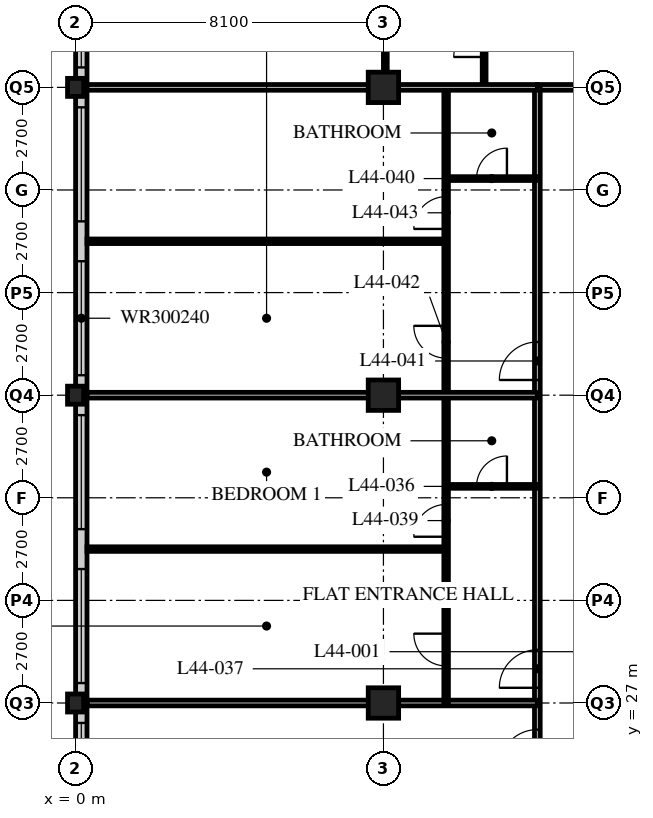
"""IFC4 building model, lengths in metres.
Left out: names, types, materials, properties, quantities, classifications, styles, units other than length and angle.
Written with IfcOpenShell. Run it as: python <this file> out.ifc"""

import sys

from ifc_helpers import new_model, si_unit, direction, frame, frame_2d, origin, origin_2d, place, context, subcontext, project, spatial, rectangle, hollow_rectangle, i_section, extrude, element, fill, save


model = new_model("IFC4")
c1 = context("Model", 3, precision=1e-05, world=origin(), true_north=direction((0.0, 1.0)))
c2 = subcontext(c1, "Body", "Model", "MODEL_VIEW")
j1 = project(units=[si_unit("LENGTHUNIT", "METRE"), si_unit("PLANEANGLEUNIT", "RADIAN")], contexts=[c1])
p1 = place(None, origin())
s1 = spatial("IfcSite", under=j1, at=p1, CompositionType="ELEMENT")
p2 = place(p1, origin())
s2 = spatial("IfcBuilding", under=s1, at=p2, CompositionType="ELEMENT")
p3 = place(p2, frame((0.0, 0.0, 174.0)))
s3 = spatial("IfcBuildingStorey", under=s2, at=p3, CompositionType="ELEMENT", Elevation=174.0)
for number, where, z_axis, x_axis in (
    (1, (0.0, 27.0, 0.0), (0.0, 0.0, 1.0), (1.0, 0.0, 0.0)),
    (2, (0.0, 35.1, 0.0), (0.0, 0.0, 1.0), (1.0, 0.0, 0.0)),
    (3, (0.0, 43.2, 0.0), (0.0, 0.0, 1.0), (1.0, 0.0, 0.0)),
):
    element("IfcColumn", number, at=place(p3, frame(where, z_axis=z_axis, x_axis=x_axis)), inside=s3, PredefinedType="COLUMN", context=c2, shape_type="SweptSolid", body=[
        extrude(i_section(OverallWidth=0.424, OverallDepth=0.475, WebThickness=0.048, FlangeThickness=0.077, FilletRadius=0.015, at=origin_2d()), origin(), (0.0, 0.0, 1.0), 3.6),
    ])
for number, where, z_axis, x_axis in (
    (4, (8.1, 27.0, 0.0), (0.0, 0.0, 1.0), (1.0, 0.0, 0.0)),
    (5, (8.1, 35.1, 0.0), (0.0, 0.0, 1.0), (1.0, 0.0, 0.0)),
    (6, (8.1, 43.2, 0.0), (0.0, 0.0, 1.0), (1.0, 0.0, 0.0)),
):
    element("IfcColumn", number, at=place(p3, frame(where, z_axis=z_axis, x_axis=x_axis)), inside=s3, PredefinedType="COLUMN", context=c2, shape_type="SweptSolid", body=[
        extrude(hollow_rectangle(XDim=0.8, YDim=0.8, WallThickness=0.08, at=origin_2d()), origin(), (0.0, 0.0, 1.0), 3.6),
    ])
p4 = place(p3, frame((0.15, 51.0, 0.0), z_axis=(0.0, 0.0, 1.0), x_axis=(0.0, -1.0, 0.0)))
e7 = element("IfcWall", 7, at=p4, inside=s3, PredefinedType="SOLIDWALL", context=c2, shape_type="SweptSolid", body=[
    extrude(rectangle(XDim=32.1, YDim=0.3, at=frame_2d((16.05, 0.0))), origin(), (0.0, 0.0, 1.0), 3.39),
])
p5 = place(p4, frame((0.225, 0.0, 0.6)))
e8 = element("IfcOpeningElement", 8, at=p5, cuts=e7, PredefinedType="OPENING", context=c2, shape_type="SweptSolid", body=[
    extrude(rectangle(XDim=3.0, YDim=2.4, at=frame_2d((1.5, 1.2))), frame((0.0, 0.16, 0.0), z_axis=(0.0, -1.0, 0.0), x_axis=(1.0, 0.0, 0.0)), (0.0, 0.0, 1.0), 0.32),
])
p6 = place(p4, frame((4.275, 0.0, 0.6)))
e9 = element("IfcOpeningElement", 9, at=p6, cuts=e7, PredefinedType="OPENING", context=c2, shape_type="SweptSolid", body=[
    extrude(rectangle(XDim=3.0, YDim=2.4, at=frame_2d((1.5, 1.2))), frame((0.0, 0.16, 0.0), z_axis=(0.0, -1.0, 0.0), x_axis=(1.0, 0.0, 0.0)), (0.0, 0.0, 1.0), 0.32),
])
p7 = place(p4, frame((8.325, 0.0, 0.6)))
e10 = element("IfcOpeningElement", 10, at=p7, cuts=e7, PredefinedType="OPENING", context=c2, shape_type="SweptSolid", body=[
    extrude(rectangle(XDim=3.0, YDim=2.4, at=frame_2d((1.5, 1.2))), frame((0.0, 0.16, 0.0), z_axis=(0.0, -1.0, 0.0), x_axis=(1.0, 0.0, 0.0)), (0.0, 0.0, 1.0), 0.32),
])
p8 = place(p4, frame((12.375, 0.0, 0.6)))
e11 = element("IfcOpeningElement", 11, at=p8, cuts=e7, PredefinedType="OPENING", context=c2, shape_type="SweptSolid", body=[
    extrude(rectangle(XDim=3.0, YDim=2.4, at=frame_2d((1.5, 1.2))), frame((0.0, 0.16, 0.0), z_axis=(0.0, -1.0, 0.0), x_axis=(1.0, 0.0, 0.0)), (0.0, 0.0, 1.0), 0.32),
])
p9 = place(p4, frame((16.425, 0.0, 0.6)))
e12 = element("IfcOpeningElement", 12, at=p9, cuts=e7, PredefinedType="OPENING", context=c2, shape_type="SweptSolid", body=[
    extrude(rectangle(XDim=3.0, YDim=2.4, at=frame_2d((1.5, 1.2))), frame((0.0, 0.16, 0.0), z_axis=(0.0, -1.0, 0.0), x_axis=(1.0, 0.0, 0.0)), (0.0, 0.0, 1.0), 0.32),
])
p10 = place(p4, frame((20.475, 0.0, 0.6)))
e13 = element("IfcOpeningElement", 13, at=p10, cuts=e7, PredefinedType="OPENING", context=c2, shape_type="SweptSolid", body=[
    extrude(rectangle(XDim=3.0, YDim=2.4, at=frame_2d((1.5, 1.2))), frame((0.0, 0.16, 0.0), z_axis=(0.0, -1.0, 0.0), x_axis=(1.0, 0.0, 0.0)), (0.0, 0.0, 1.0), 0.32),
])
p11 = place(p4, frame((24.525, 0.0, 0.6)))
e14 = element("IfcOpeningElement", 14, at=p11, cuts=e7, PredefinedType="OPENING", context=c2, shape_type="SweptSolid", body=[
    extrude(rectangle(XDim=3.0, YDim=2.4, at=frame_2d((1.5, 1.2))), frame((0.0, 0.16, 0.0), z_axis=(0.0, -1.0, 0.0), x_axis=(1.0, 0.0, 0.0)), (0.0, 0.0, 1.0), 0.32),
])
p12 = place(p4, frame((28.575, 0.0, 0.6)))
e15 = element("IfcOpeningElement", 15, at=p12, cuts=e7, PredefinedType="OPENING", context=c2, shape_type="SweptSolid", body=[
    extrude(rectangle(XDim=3.0, YDim=2.4, at=frame_2d((1.5, 1.2))), frame((0.0, 0.16, 0.0), z_axis=(0.0, -1.0, 0.0), x_axis=(1.0, 0.0, 0.0)), (0.0, 0.0, 1.0), 0.32),
])
p13 = place(p3, frame((12.15, 43.2, 0.0), z_axis=(0.0, 0.0, 1.0), x_axis=(1.0, 0.0, 0.0)))
e16 = element("IfcWall", 16, at=p13, inside=s3, PredefinedType="PARTITIONING", context=c2, shape_type="SweptSolid", body=[
    extrude(rectangle(XDim=32.4, YDim=0.15, at=frame_2d((16.2, 0.0))), origin(), (0.0, 0.0, 1.0), 2.778),
])
p14 = place(p13, frame((4.95, 0.0, 0.0)))
e17 = element("IfcOpeningElement", 17, at=p14, cuts=e16, PredefinedType="OPENING", context=c2, shape_type="SweptSolid", body=[
    extrude(rectangle(XDim=1.0, YDim=2.1, at=frame_2d((0.5, 1.05))), frame((0.0, 0.085, 0.0), z_axis=(0.0, -1.0, 0.0), x_axis=(1.0, 0.0, 0.0)), (0.0, 0.0, 1.0), 0.17),
])
p15 = place(p13, frame((13.05, 0.0, 0.0)))
e18 = element("IfcOpeningElement", 18, at=p15, cuts=e16, PredefinedType="OPENING", context=c2, shape_type="SweptSolid", body=[
    extrude(rectangle(XDim=1.0, YDim=2.1, at=frame_2d((0.5, 1.05))), frame((0.0, 0.085, 0.0), z_axis=(0.0, -1.0, 0.0), x_axis=(1.0, 0.0, 0.0)), (0.0, 0.0, 1.0), 0.17),
])
p16 = place(p13, frame((21.15, 0.0, 0.0)))
e19 = element("IfcOpeningElement", 19, at=p16, cuts=e16, PredefinedType="OPENING", context=c2, shape_type="SweptSolid", body=[
    extrude(rectangle(XDim=1.0, YDim=2.1, at=frame_2d((0.5, 1.05))), frame((0.0, 0.085, 0.0), z_axis=(0.0, -1.0, 0.0), x_axis=(1.0, 0.0, 0.0)), (0.0, 0.0, 1.0), 0.17),
])
p17 = place(p13, frame((29.875, 0.0, 0.0)))
e20 = element("IfcOpeningElement", 20, at=p17, cuts=e16, PredefinedType="OPENING", context=c2, shape_type="SweptSolid", body=[
    extrude(rectangle(XDim=1.0, YDim=2.1, at=frame_2d((0.5, 1.05))), frame((0.0, 0.085, 0.0), z_axis=(0.0, -1.0, 0.0), x_axis=(1.0, 0.0, 0.0)), (0.0, 0.0, 1.0), 0.17),
])
p18 = place(p13, frame((1.525, 0.0, 0.0)))
e21 = element("IfcOpeningElement", 21, at=p18, cuts=e16, PredefinedType="OPENING", context=c2, shape_type="SweptSolid", body=[
    extrude(rectangle(XDim=1.0, YDim=2.1, at=frame_2d((0.5, 1.05))), frame((0.0, 0.085, 0.0), z_axis=(0.0, -1.0, 0.0), x_axis=(1.0, 0.0, 0.0)), (0.0, 0.0, 1.0), 0.17),
])
p19 = place(p3, frame((12.15, 18.9, 0.0), z_axis=(0.0, 0.0, 1.0), x_axis=(0.0, 1.0, 0.0)))
e22 = element("IfcWall", 22, at=p19, inside=s3, PredefinedType="PARTITIONING", context=c2, shape_type="SweptSolid", body=[
    extrude(rectangle(XDim=24.3, YDim=0.15, at=frame_2d((12.15, 0.0))), origin(), (0.0, 0.0, 1.0), 3.39),
])
p20 = place(p19, frame((2.35, 0.0, 0.0)))
e23 = element("IfcOpeningElement", 23, at=p20, cuts=e22, PredefinedType="OPENING", context=c2, shape_type="SweptSolid", body=[
    extrude(rectangle(XDim=1.0, YDim=2.1, at=frame_2d((0.5, 1.05))), frame((0.0, 0.085, 0.0), z_axis=(0.0, -1.0, 0.0), x_axis=(1.0, 0.0, 0.0)), (0.0, 0.0, 1.0), 0.17),
])
p21 = place(p19, frame((6.4, 0.0, 0.0)))
e24 = element("IfcOpeningElement", 24, at=p21, cuts=e22, PredefinedType="OPENING", context=c2, shape_type="SweptSolid", body=[
    extrude(rectangle(XDim=1.0, YDim=2.1, at=frame_2d((0.5, 1.05))), frame((0.0, 0.085, 0.0), z_axis=(0.0, -1.0, 0.0), x_axis=(1.0, 0.0, 0.0)), (0.0, 0.0, 1.0), 0.17),
])
p22 = place(p19, frame((8.5, 0.0, 0.0)))
e25 = element("IfcOpeningElement", 25, at=p22, cuts=e22, PredefinedType="OPENING", context=c2, shape_type="SweptSolid", body=[
    extrude(rectangle(XDim=1.0, YDim=2.1, at=frame_2d((0.5, 1.05))), frame((0.0, 0.085, 0.0), z_axis=(0.0, -1.0, 0.0), x_axis=(1.0, 0.0, 0.0)), (0.0, 0.0, 1.0), 0.17),
])
p23 = place(p19, frame((16.6, 0.0, 0.0)))
e26 = element("IfcOpeningElement", 26, at=p23, cuts=e22, PredefinedType="OPENING", context=c2, shape_type="SweptSolid", body=[
    extrude(rectangle(XDim=1.0, YDim=2.1, at=frame_2d((0.5, 1.05))), frame((0.0, 0.085, 0.0), z_axis=(0.0, -1.0, 0.0), x_axis=(1.0, 0.0, 0.0)), (0.0, 0.0, 1.0), 0.17),
])
p24 = place(p3, frame((12.15, 27.0, 0.0), z_axis=(0.0, 0.0, 1.0), x_axis=(-1.0, 0.0, 0.0)))
e27 = element("IfcWall", 27, at=p24, inside=s3, PredefinedType="PARTITIONING", context=c2, shape_type="SweptSolid", body=[
    extrude(rectangle(XDim=11.85, YDim=0.15, at=frame_2d((5.925, 0.0))), origin(), (0.0, 0.0, 1.0), 2.778),
])
p25 = place(p3, frame((9.75, 27.0, 0.0), z_axis=(0.0, 0.0, 1.0), x_axis=(0.0, 1.0, 0.0)))
e28 = element("IfcWall", 28, at=p25, inside=s3, PredefinedType="PARTITIONING", context=c2, shape_type="SweptSolid", body=[
    extrude(rectangle(XDim=16.2, YDim=0.12, at=frame_2d((8.1, 0.0))), origin(), (0.0, 0.0, 1.0), 3.39),
])
p26 = place(p25, frame((0.975, 0.0, 0.0)))
e29 = element("IfcOpeningElement", 29, at=p26, cuts=e28, PredefinedType="OPENING", context=c2, shape_type="SweptSolid", body=[
    extrude(rectangle(XDim=0.85, YDim=2.1, at=frame_2d((0.425, 1.05))), frame((0.0, 0.07, 0.0), z_axis=(0.0, -1.0, 0.0), x_axis=(1.0, 0.0, 0.0)), (0.0, 0.0, 1.0), 0.14),
])
p27 = place(p25, frame((4.375, 0.0, 0.0)))
e30 = element("IfcOpeningElement", 30, at=p27, cuts=e28, PredefinedType="OPENING", context=c2, shape_type="SweptSolid", body=[
    extrude(rectangle(XDim=0.85, YDim=2.1, at=frame_2d((0.425, 1.05))), frame((0.0, 0.07, 0.0), z_axis=(0.0, -1.0, 0.0), x_axis=(1.0, 0.0, 0.0)), (0.0, 0.0, 1.0), 0.14),
])
p28 = place(p25, frame((9.075, 0.0, 0.0)))
e31 = element("IfcOpeningElement", 31, at=p28, cuts=e28, PredefinedType="OPENING", context=c2, shape_type="SweptSolid", body=[
    extrude(rectangle(XDim=0.85, YDim=2.1, at=frame_2d((0.425, 1.05))), frame((0.0, 0.07, 0.0), z_axis=(0.0, -1.0, 0.0), x_axis=(1.0, 0.0, 0.0)), (0.0, 0.0, 1.0), 0.14),
])
p29 = place(p25, frame((12.475, 0.0, 0.0)))
e32 = element("IfcOpeningElement", 32, at=p29, cuts=e28, PredefinedType="OPENING", context=c2, shape_type="SweptSolid", body=[
    extrude(rectangle(XDim=0.85, YDim=2.1, at=frame_2d((0.425, 1.05))), frame((0.0, 0.07, 0.0), z_axis=(0.0, -1.0, 0.0), x_axis=(1.0, 0.0, 0.0)), (0.0, 0.0, 1.0), 0.14),
])
p30 = place(p3, frame((12.15, 32.7, 0.0), z_axis=(0.0, 0.0, 1.0), x_axis=(-1.0, 0.0, 0.0)))
e33 = element("IfcWall", 33, at=p30, inside=s3, PredefinedType="PARTITIONING", context=c2, shape_type="SweptSolid", body=[
    extrude(rectangle(XDim=2.4, YDim=0.1, at=frame_2d((1.2, 0.0))), origin(), (0.0, 0.0, 1.0), 3.39),
])
p31 = place(p30, frame((0.8, 0.0, 0.0)))
e34 = element("IfcOpeningElement", 34, at=p31, cuts=e33, PredefinedType="OPENING", context=c2, shape_type="SweptSolid", body=[
    extrude(rectangle(XDim=0.8, YDim=2.1, at=frame_2d((0.4, 1.05))), frame((0.0, 0.06, 0.0), z_axis=(0.0, -1.0, 0.0), x_axis=(1.0, 0.0, 0.0)), (0.0, 0.0, 1.0), 0.12),
])
p32 = place(p3, frame((9.75, 31.05, 0.0), z_axis=(0.0, 0.0, 1.0), x_axis=(-1.0, 0.0, 0.0)))
e35 = element("IfcWall", 35, at=p32, inside=s3, PredefinedType="PARTITIONING", context=c2, shape_type="SweptSolid", body=[
    extrude(rectangle(XDim=9.45, YDim=0.12, at=frame_2d((4.725, 0.0))), origin(), (0.0, 0.0, 1.0), 3.39),
])
p33 = place(p3, frame((12.15, 35.1, 0.0), z_axis=(0.0, 0.0, 1.0), x_axis=(-1.0, 0.0, 0.0)))
e36 = element("IfcWall", 36, at=p33, inside=s3, PredefinedType="PARTITIONING", context=c2, shape_type="SweptSolid", body=[
    extrude(rectangle(XDim=11.85, YDim=0.15, at=frame_2d((5.925, 0.0))), origin(), (0.0, 0.0, 1.0), 2.778),
])
p34 = place(p3, frame((12.15, 40.8, 0.0), z_axis=(0.0, 0.0, 1.0), x_axis=(-1.0, 0.0, 0.0)))
e37 = element("IfcWall", 37, at=p34, inside=s3, PredefinedType="PARTITIONING", context=c2, shape_type="SweptSolid", body=[
    extrude(rectangle(XDim=2.4, YDim=0.1, at=frame_2d((1.2, 0.0))), origin(), (0.0, 0.0, 1.0), 3.39),
])
p35 = place(p34, frame((0.8, 0.0, 0.0)))
e38 = element("IfcOpeningElement", 38, at=p35, cuts=e37, PredefinedType="OPENING", context=c2, shape_type="SweptSolid", body=[
    extrude(rectangle(XDim=0.8, YDim=2.1, at=frame_2d((0.4, 1.05))), frame((0.0, 0.06, 0.0), z_axis=(0.0, -1.0, 0.0), x_axis=(1.0, 0.0, 0.0)), (0.0, 0.0, 1.0), 0.12),
])
p36 = place(p3, frame((9.75, 39.15, 0.0), z_axis=(0.0, 0.0, 1.0), x_axis=(-1.0, 0.0, 0.0)))
e39 = element("IfcWall", 39, at=p36, inside=s3, PredefinedType="PARTITIONING", context=c2, shape_type="SweptSolid", body=[
    extrude(rectangle(XDim=9.45, YDim=0.12, at=frame_2d((4.725, 0.0))), origin(), (0.0, 0.0, 1.0), 3.39),
])
p37 = place(p3, frame((10.75, 43.2, 0.0), z_axis=(0.0, 0.0, 1.0), x_axis=(0.0, 1.0, 0.0)))
e40 = element("IfcWall", 40, at=p37, inside=s3, PredefinedType="PARTITIONING", context=c2, shape_type="SweptSolid", body=[
    extrude(rectangle(XDim=2.4, YDim=0.1, at=frame_2d((1.2, 0.0))), origin(), (0.0, 0.0, 1.0), 3.39),
])
p38 = place(p37, frame((0.8, 0.0, 0.0)))
e41 = element("IfcOpeningElement", 41, at=p38, cuts=e40, PredefinedType="OPENING", context=c2, shape_type="SweptSolid", body=[
    extrude(rectangle(XDim=0.8, YDim=2.1, at=frame_2d((0.4, 1.05))), frame((0.0, 0.06, 0.0), z_axis=(0.0, -1.0, 0.0), x_axis=(1.0, 0.0, 0.0)), (0.0, 0.0, 1.0), 0.12),
])
p39 = place(p3, frame((8.15, 43.2, 0.0), z_axis=(0.0, 0.0, 1.0), x_axis=(0.0, 1.0, 0.0)))
e42 = element("IfcWall", 42, at=p39, inside=s3, PredefinedType="PARTITIONING", context=c2, shape_type="SweptSolid", body=[
    extrude(rectangle(XDim=2.4, YDim=0.1, at=frame_2d((1.2, 0.0))), origin(), (0.0, 0.0, 1.0), 2.778),
])
p40 = place(p3, frame((0.3, 43.2, 0.0), z_axis=(0.0, 0.0, 1.0), x_axis=(1.0, 0.0, 0.0)))
e43 = element("IfcWall", 43, at=p40, inside=s3, PredefinedType="PARTITIONING", context=c2, shape_type="SweptSolid", body=[
    extrude(rectangle(XDim=11.85, YDim=0.15, at=frame_2d((5.925, 0.0))), origin(), (0.0, 0.0, 1.0), 2.778),
])
p41 = place(p6, origin())
e44 = element("IfcWindow", 44, at=p41, inside=s3, PartitioningType="SINGLE_PANEL", PredefinedType="WINDOW", context=c2, shape_type="SweptSolid", body=[
    extrude(rectangle(XDim=3.0, YDim=2.4, at=frame_2d((1.5, 1.2))), frame((0.0, 0.03, 0.0), z_axis=(0.0, -1.0, 0.0), x_axis=(1.0, 0.0, 0.0)), (0.0, 0.0, 1.0), 0.06),
])
fill(e9, e44)
p42 = place(p7, origin())
e45 = element("IfcWindow", 45, at=p42, inside=s3, PartitioningType="SINGLE_PANEL", PredefinedType="WINDOW", context=c2, shape_type="SweptSolid", body=[
    extrude(rectangle(XDim=3.0, YDim=2.4, at=frame_2d((1.5, 1.2))), frame((0.0, 0.03, 0.0), z_axis=(0.0, -1.0, 0.0), x_axis=(1.0, 0.0, 0.0)), (0.0, 0.0, 1.0), 0.06),
])
fill(e10, e45)
p43 = place(p8, origin())
e46 = element("IfcWindow", 46, at=p43, inside=s3, PartitioningType="SINGLE_PANEL", PredefinedType="WINDOW", context=c2, shape_type="SweptSolid", body=[
    extrude(rectangle(XDim=3.0, YDim=2.4, at=frame_2d((1.5, 1.2))), frame((0.0, 0.03, 0.0), z_axis=(0.0, -1.0, 0.0), x_axis=(1.0, 0.0, 0.0)), (0.0, 0.0, 1.0), 0.06),
])
fill(e11, e46)
p44 = place(p9, origin())
e47 = element("IfcWindow", 47, at=p44, inside=s3, PartitioningType="SINGLE_PANEL", PredefinedType="WINDOW", context=c2, shape_type="SweptSolid", body=[
    extrude(rectangle(XDim=3.0, YDim=2.4, at=frame_2d((1.5, 1.2))), frame((0.0, 0.03, 0.0), z_axis=(0.0, -1.0, 0.0), x_axis=(1.0, 0.0, 0.0)), (0.0, 0.0, 1.0), 0.06),
])
fill(e12, e47)
p45 = place(p10, origin())
e48 = element("IfcWindow", 48, at=p45, inside=s3, PartitioningType="SINGLE_PANEL", PredefinedType="WINDOW", context=c2, shape_type="SweptSolid", body=[
    extrude(rectangle(XDim=3.0, YDim=2.4, at=frame_2d((1.5, 1.2))), frame((0.0, 0.03, 0.0), z_axis=(0.0, -1.0, 0.0), x_axis=(1.0, 0.0, 0.0)), (0.0, 0.0, 1.0), 0.06),
])
fill(e13, e48)
p46 = place(p11, origin())
e49 = element("IfcWindow", 49, at=p46, inside=s3, PartitioningType="SINGLE_PANEL", PredefinedType="WINDOW", context=c2, shape_type="SweptSolid", body=[
    extrude(rectangle(XDim=3.0, YDim=2.4, at=frame_2d((1.5, 1.2))), frame((0.0, 0.03, 0.0), z_axis=(0.0, -1.0, 0.0), x_axis=(1.0, 0.0, 0.0)), (0.0, 0.0, 1.0), 0.06),
])
fill(e14, e49)
p47 = place(p21, origin())
e50 = element("IfcDoor", 50, at=p47, inside=s3, OperationType="SINGLE_SWING_LEFT", PredefinedType="DOOR", context=c2, shape_type="SweptSolid", body=[
    extrude(rectangle(XDim=1.0, YDim=2.1, at=frame_2d((0.5, 1.05))), frame((0.0, 0.025, 0.0), z_axis=(0.0, -1.0, 0.0), x_axis=(1.0, 0.0, 0.0)), (0.0, 0.0, 1.0), 0.05),
])
fill(e24, e50)
p48 = place(p31, origin())
e51 = element("IfcDoor", 51, at=p48, inside=s3, OperationType="SINGLE_SWING_RIGHT", PredefinedType="DOOR", context=c2, shape_type="SweptSolid", body=[
    extrude(rectangle(XDim=0.8, YDim=2.1, at=frame_2d((0.4, 1.05))), frame((0.0, 0.025, 0.0), z_axis=(0.0, -1.0, 0.0), x_axis=(1.0, 0.0, 0.0)), (0.0, 0.0, 1.0), 0.05),
])
fill(e34, e51)
p49 = place(p22, origin())
e52 = element("IfcDoor", 52, at=p49, inside=s3, OperationType="SINGLE_SWING_LEFT", PredefinedType="DOOR", context=c2, shape_type="SweptSolid", body=[
    extrude(rectangle(XDim=1.0, YDim=2.1, at=frame_2d((0.5, 1.05))), frame((0.0, 0.025, 0.0), z_axis=(0.0, -1.0, 0.0), x_axis=(1.0, 0.0, 0.0)), (0.0, 0.0, 1.0), 0.05),
])
fill(e25, e52)
p50 = place(p26, origin())
e53 = element("IfcDoor", 53, at=p50, inside=s3, OperationType="SINGLE_SWING_RIGHT", PredefinedType="DOOR", context=c2, shape_type="SweptSolid", body=[
    extrude(rectangle(XDim=0.85, YDim=2.1, at=frame_2d((0.425, 1.05))), frame((0.0, 0.025, 0.0), z_axis=(0.0, -1.0, 0.0), x_axis=(1.0, 0.0, 0.0)), (0.0, 0.0, 1.0), 0.05),
])
fill(e29, e53)
p51 = place(p27, origin())
e54 = element("IfcDoor", 54, at=p51, inside=s3, OperationType="SINGLE_SWING_LEFT", PredefinedType="DOOR", context=c2, shape_type="SweptSolid", body=[
    extrude(rectangle(XDim=0.85, YDim=2.1, at=frame_2d((0.425, 1.05))), frame((0.0, 0.025, 0.0), z_axis=(0.0, -1.0, 0.0), x_axis=(1.0, 0.0, 0.0)), (0.0, 0.0, 1.0), 0.05),
])
fill(e30, e54)
p52 = place(p35, origin())
e55 = element("IfcDoor", 55, at=p52, inside=s3, OperationType="SINGLE_SWING_RIGHT", PredefinedType="DOOR", context=c2, shape_type="SweptSolid", body=[
    extrude(rectangle(XDim=0.8, YDim=2.1, at=frame_2d((0.4, 1.05))), frame((0.0, 0.025, 0.0), z_axis=(0.0, -1.0, 0.0), x_axis=(1.0, 0.0, 0.0)), (0.0, 0.0, 1.0), 0.05),
])
fill(e38, e55)
p53 = place(p23, origin())
e56 = element("IfcDoor", 56, at=p53, inside=s3, OperationType="SINGLE_SWING_LEFT", PredefinedType="DOOR", context=c2, shape_type="SweptSolid", body=[
    extrude(rectangle(XDim=1.0, YDim=2.1, at=frame_2d((0.5, 1.05))), frame((0.0, 0.025, 0.0), z_axis=(0.0, -1.0, 0.0), x_axis=(1.0, 0.0, 0.0)), (0.0, 0.0, 1.0), 0.05),
])
fill(e26, e56)
p54 = place(p28, origin())
e57 = element("IfcDoor", 57, at=p54, inside=s3, OperationType="SINGLE_SWING_RIGHT", PredefinedType="DOOR", context=c2, shape_type="SweptSolid", body=[
    extrude(rectangle(XDim=0.85, YDim=2.1, at=frame_2d((0.425, 1.05))), frame((0.0, 0.025, 0.0), z_axis=(0.0, -1.0, 0.0), x_axis=(1.0, 0.0, 0.0)), (0.0, 0.0, 1.0), 0.05),
])
fill(e31, e57)
p55 = place(p29, origin())
e58 = element("IfcDoor", 58, at=p55, inside=s3, OperationType="SINGLE_SWING_LEFT", PredefinedType="DOOR", context=c2, shape_type="SweptSolid", body=[
    extrude(rectangle(XDim=0.85, YDim=2.1, at=frame_2d((0.425, 1.05))), frame((0.0, 0.025, 0.0), z_axis=(0.0, -1.0, 0.0), x_axis=(1.0, 0.0, 0.0)), (0.0, 0.0, 1.0), 0.05),
])
fill(e32, e58)
p56 = place(p38, origin())
e59 = element("IfcDoor", 59, at=p56, inside=s3, OperationType="SINGLE_SWING_LEFT", PredefinedType="DOOR", context=c2, shape_type="SweptSolid", body=[
    extrude(rectangle(XDim=0.8, YDim=2.1, at=frame_2d((0.4, 1.05))), frame((0.0, 0.025, 0.0), z_axis=(0.0, -1.0, 0.0), x_axis=(1.0, 0.0, 0.0)), (0.0, 0.0, 1.0), 0.05),
])
fill(e41, e59)
save(model, sys.argv[1])
